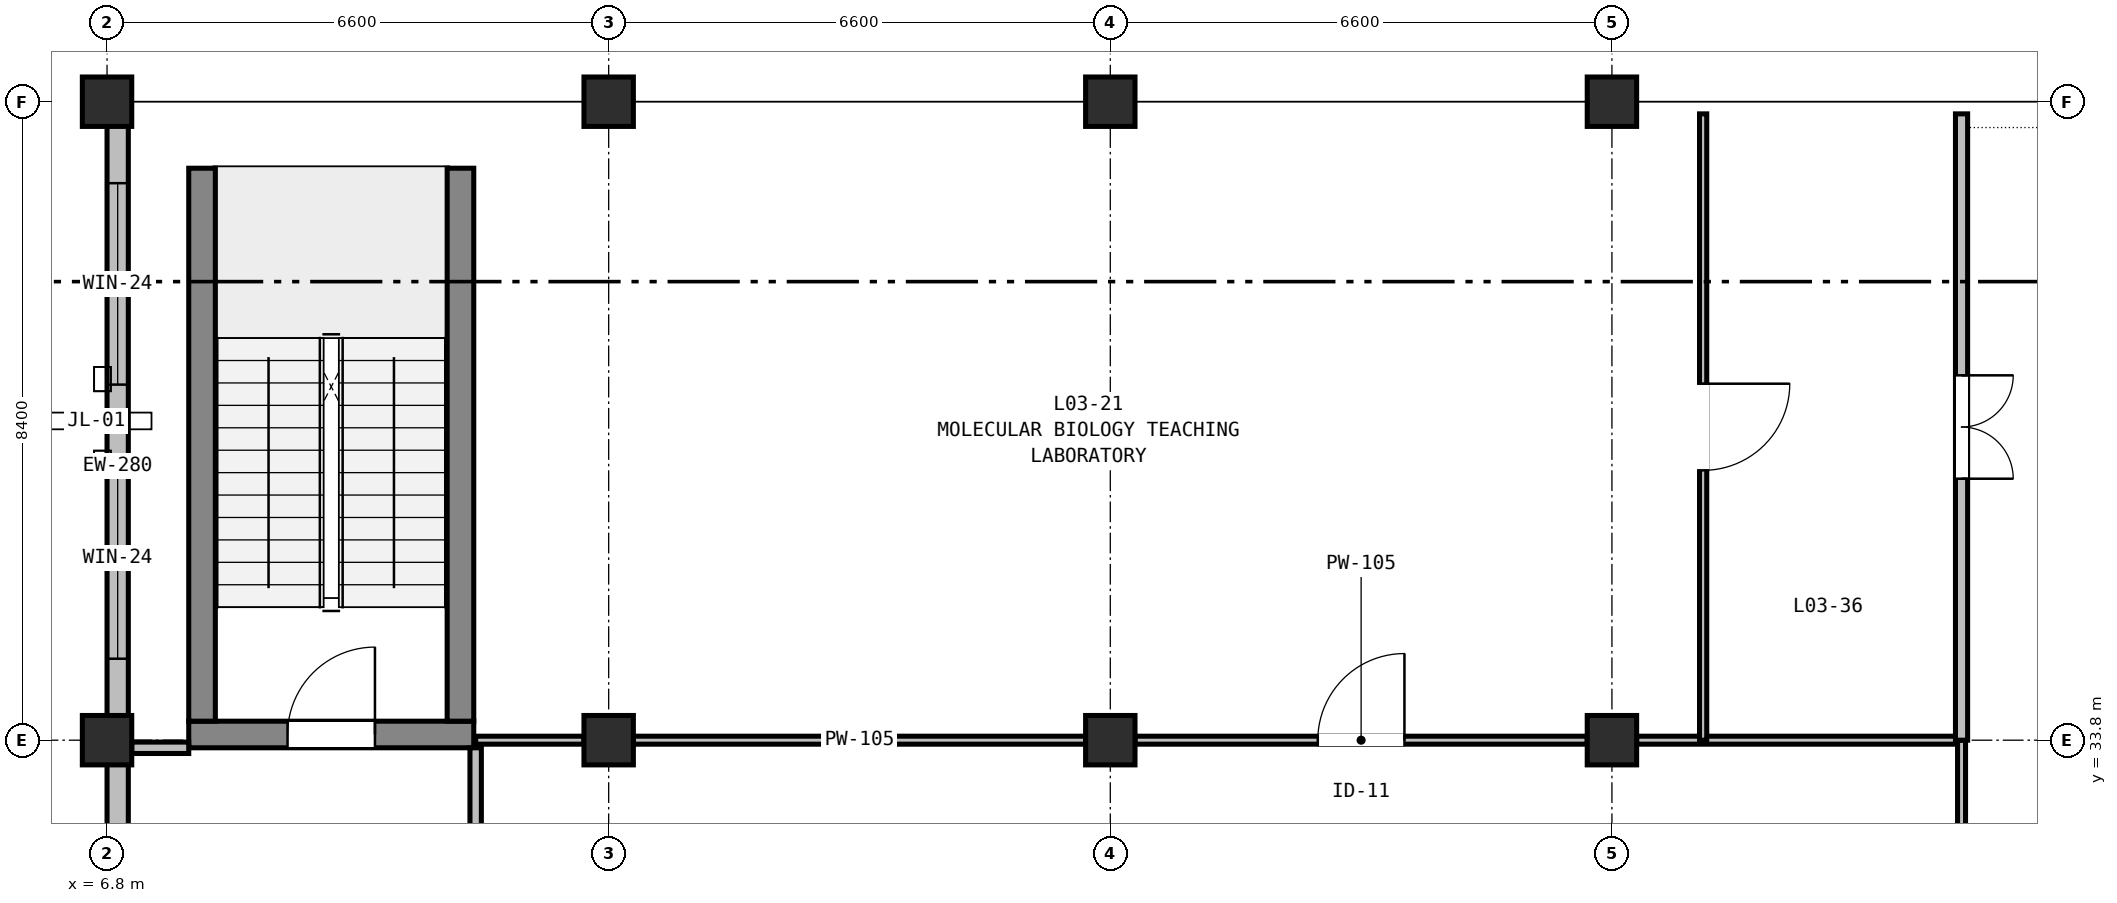
"""IFC4 building model, lengths in metres.
Left out: names, types, materials, properties, quantities, classifications, styles, units other than length and angle.
Written with IfcOpenShell. Run it as: python <this file> out.ifc"""

import sys

from ifc_helpers import new_model, si_unit, direction, frame, frame_2d, origin, origin_2d, place, context, subcontext, project, spatial, rectangle, extrude, element, fill, save


model = new_model("IFC4")
c1 = context("Model", 3, precision=1e-05, world=origin(), true_north=direction((0.0, 1.0)))
c2 = subcontext(c1, "Body", "Model", "MODEL_VIEW")
j1 = project(units=[si_unit("LENGTHUNIT", "METRE"), si_unit("PLANEANGLEUNIT", "RADIAN")], contexts=[c1])
p1 = place(None, origin())
s1 = spatial("IfcSite", under=j1, at=p1, CompositionType="ELEMENT")
p2 = place(p1, origin())
s2 = spatial("IfcBuilding", under=s1, at=p2, CompositionType="ELEMENT")
p3 = place(p2, frame((0.0, 0.0, 15.0)))
s3 = spatial("IfcBuildingStorey", under=s2, at=p3, CompositionType="ELEMENT", Elevation=15.0)
for number, where, z_axis, x_axis in (
    (1, (6.8, 33.8, 0.0), (0.0, 0.0, 1.0), (1.0, 0.0, 0.0)),
    (2, (6.8, 42.2, 0.0), (0.0, 0.0, 1.0), (1.0, 0.0, 0.0)),
    (3, (13.4, 33.8, 0.0), (0.0, 0.0, 1.0), (1.0, 0.0, 0.0)),
    (4, (13.4, 42.2, 0.0), (0.0, 0.0, 1.0), (1.0, 0.0, 0.0)),
    (5, (20.0, 33.8, 0.0), (0.0, 0.0, 1.0), (1.0, 0.0, 0.0)),
    (6, (20.0, 42.2, 0.0), (0.0, 0.0, 1.0), (1.0, 0.0, 0.0)),
    (7, (26.6, 33.8, 0.0), (0.0, 0.0, 1.0), (1.0, 0.0, 0.0)),
    (8, (26.6, 42.2, 0.0), (0.0, 0.0, 1.0), (1.0, 0.0, 0.0)),
):
    element("IfcColumn", number, at=place(p3, frame(where, z_axis=z_axis, x_axis=x_axis)), inside=s3, PredefinedType="COLUMN", context=c2, shape_type="SweptSolid", body=[
        extrude(rectangle(XDim=0.65, YDim=0.65, at=origin_2d()), origin(), (0.0, 0.0, 1.0), 4.5),
    ])
p4 = place(p3, frame((7.875, 33.875, 0.0), z_axis=(0.0, 0.0, 1.0), x_axis=(1.0, 0.0, 0.0)))
e9 = element("IfcWall", 9, at=p4, inside=s3, PredefinedType="SHEAR", context=c2, shape_type="SweptSolid", body=[
    extrude(rectangle(XDim=3.75, YDim=0.35, at=frame_2d((1.875, 0.0))), origin(), (0.0, 0.0, 1.0), 4.5),
])
p5 = place(p4, frame((1.3, 0.0, 0.0)))
e10 = element("IfcOpeningElement", 10, at=p5, cuts=e9, PredefinedType="OPENING", context=c2, shape_type="SweptSolid", body=[
    extrude(rectangle(XDim=1.15, YDim=2.15, at=frame_2d((0.575, 1.075))), frame((0.0, 0.185, 0.0), z_axis=(0.0, -1.0, 0.0), x_axis=(1.0, 0.0, 0.0)), (0.0, 0.0, 1.0), 0.37),
])
p6 = place(p3, frame((7.875, 41.5, 0.0), z_axis=(0.0, 0.0, 1.0), x_axis=(1.0, 0.0, 0.0)))
e11 = element("IfcWall", 11, at=p6, inside=s3, PredefinedType="SHEAR", context=c2, shape_type="SweptSolid", body=[
    extrude(rectangle(XDim=3.75, YDim=0.35, at=frame_2d((1.875, 0.0))), origin(), (0.0, 0.0, 1.0), 4.5),
])
for number, where, z_axis, x_axis in (
    (12, (8.05, 34.05, 0.0), (0.0, 0.0, 1.0), (0.0, 1.0, 0.0)),
    (13, (11.45, 34.05, 0.0), (0.0, 0.0, 1.0), (0.0, 1.0, 0.0)),
):
    element("IfcWall", number, at=place(p3, frame(where, z_axis=z_axis, x_axis=x_axis)), inside=s3, PredefinedType="SHEAR", context=c2, shape_type="SweptSolid", body=[
        extrude(rectangle(XDim=7.275, YDim=0.35, at=frame_2d((3.637, 0.0))), origin(), (0.0, 0.0, 1.0), 4.5),
    ])
p7 = place(p3, frame((6.94, 25.4, 0.0), z_axis=(0.0, 0.0, 1.0), x_axis=(0.0, 1.0, 0.0)))
e14 = element("IfcWall", 14, at=p7, inside=s3, PredefinedType="STANDARD", context=c2, shape_type="SweptSolid", body=[
    extrude(rectangle(XDim=8.12, YDim=0.28, at=frame_2d((4.06, 0.0))), origin(), (0.0, 0.0, 1.0), 3.785),
])
p8 = place(p7, frame((1.717, 0.0, 0.9)))
e15 = element("IfcOpeningElement", 15, at=p8, cuts=e14, PredefinedType="OPENING", context=c2, shape_type="SweptSolid", body=[
    extrude(rectangle(XDim=0.95, YDim=1.8, at=frame_2d((0.475, 0.9))), frame((0.0, 0.15, 0.0), z_axis=(0.0, -1.0, 0.0), x_axis=(1.0, 0.0, 0.0)), (0.0, 0.0, 1.0), 0.3),
])
p9 = place(p7, frame((5.453, 0.0, 0.9)))
e16 = element("IfcOpeningElement", 16, at=p9, cuts=e14, PredefinedType="OPENING", context=c2, shape_type="SweptSolid", body=[
    extrude(rectangle(XDim=0.95, YDim=1.8, at=frame_2d((0.475, 0.9))), frame((0.0, 0.15, 0.0), z_axis=(0.0, -1.0, 0.0), x_axis=(1.0, 0.0, 0.0)), (0.0, 0.0, 1.0), 0.3),
])
p10 = place(p3, frame((6.94, 34.08, 0.0), z_axis=(0.0, 0.0, 1.0), x_axis=(0.0, 1.0, 0.0)))
e17 = element("IfcWall", 17, at=p10, inside=s3, PredefinedType="STANDARD", context=c2, shape_type="SweptSolid", body=[
    extrude(rectangle(XDim=7.84, YDim=0.28, at=frame_2d((3.92, 0.0))), origin(), (0.0, 0.0, 1.0), 3.785),
])
p11 = place(p10, frame((0.792, 0.0, 0.9)))
e18 = element("IfcOpeningElement", 18, at=p11, cuts=e17, PredefinedType="OPENING", context=c2, shape_type="SweptSolid", body=[
    extrude(rectangle(XDim=2.65, YDim=1.85, at=frame_2d((1.325, 0.925))), frame((0.0, 0.15, 0.0), z_axis=(0.0, -1.0, 0.0), x_axis=(1.0, 0.0, 0.0)), (0.0, 0.0, 1.0), 0.3),
])
p12 = place(p10, frame((4.398, 0.0, 0.9)))
e19 = element("IfcOpeningElement", 19, at=p12, cuts=e17, PredefinedType="OPENING", context=c2, shape_type="SweptSolid", body=[
    extrude(rectangle(XDim=2.65, YDim=1.85, at=frame_2d((1.325, 0.925))), frame((0.0, 0.15, 0.0), z_axis=(0.0, -1.0, 0.0), x_axis=(1.0, 0.0, 0.0)), (0.0, 0.0, 1.0), 0.3),
])
for number, where, z_axis, x_axis in (
    (20, (6.8, 42.06, 0.0), (0.0, 0.0, 1.0), (1.0, 0.0, 0.0)),
    (21, (12.88, 42.06, 0.0), (0.0, 0.0, 1.0), (1.0, 0.0, 0.0)),
    (22, (13.4, 42.06, 0.0), (0.0, 0.0, 1.0), (1.0, 0.0, 0.0)),
    (23, (19.48, 42.06, 0.0), (0.0, 0.0, 1.0), (1.0, 0.0, 0.0)),
    (24, (20.0, 42.06, 0.0), (0.0, 0.0, 1.0), (1.0, 0.0, 0.0)),
    (25, (26.08, 42.06, 0.0), (0.0, 0.0, 1.0), (1.0, 0.0, 0.0)),
    (26, (26.6, 42.06, 0.0), (0.0, 0.0, 1.0), (1.0, 0.0, 0.0)),
):
    element("IfcWall", number, at=place(p3, frame(where, z_axis=z_axis, x_axis=x_axis)), inside=s3, PredefinedType="STANDARD", context=c2, shape_type="SweptSolid", body=[
        extrude(rectangle(XDim=0.52, YDim=0.28, at=frame_2d((0.26, 0.0))), origin(), (0.0, 0.0, 1.0), 3.735),
    ])
p13 = place(p3, frame((7.125, 33.7, 0.0), z_axis=(0.0, 0.0, 1.0), x_axis=(1.0, 0.0, 0.0)))
e27 = element("IfcWall", 27, at=p13, inside=s3, PredefinedType="PARTITIONING", context=c2, shape_type="SweptSolid", body=[
    extrude(rectangle(XDim=0.75, YDim=0.15, at=frame_2d((0.375, 0.0))), origin(), (0.0, 0.0, 1.0), 3.835),
])
p14 = place(p3, frame((11.65, 33.7, 0.0), z_axis=(0.0, 0.0, 1.0), x_axis=(0.0, -1.0, 0.0)))
e28 = element("IfcWall", 28, at=p14, inside=s3, PredefinedType="PARTITIONING", context=c2, shape_type="SweptSolid", body=[
    extrude(rectangle(XDim=3.6, YDim=0.15, at=frame_2d((1.8, 0.0))), origin(), (0.0, 0.0, 1.0), 3.835),
])
p15 = place(p3, frame((11.65, 33.8, 0.0), z_axis=(0.0, 0.0, 1.0), x_axis=(1.0, 0.0, 0.0)))
e29 = element("IfcWall", 29, at=p15, inside=s3, PredefinedType="PARTITIONING", context=c2, shape_type="SweptSolid", body=[
    extrude(rectangle(XDim=1.425, YDim=0.105, at=frame_2d((0.712, 0.0))), origin(), (0.0, 0.0, 1.0), 3.835),
])
p16 = place(p3, frame((13.725, 33.8, 0.0), z_axis=(0.0, 0.0, 1.0), x_axis=(1.0, 0.0, 0.0)))
e30 = element("IfcWall", 30, at=p16, inside=s3, PredefinedType="PARTITIONING", context=c2, shape_type="SweptSolid", body=[
    extrude(rectangle(XDim=5.95, YDim=0.105, at=frame_2d((2.975, 0.0))), origin(), (0.0, 0.0, 1.0), 3.835),
])
p17 = place(p3, frame((20.325, 33.8, 0.0), z_axis=(0.0, 0.0, 1.0), x_axis=(1.0, 0.0, 0.0)))
e31 = element("IfcWall", 31, at=p17, inside=s3, PredefinedType="PARTITIONING", context=c2, shape_type="SweptSolid", body=[
    extrude(rectangle(XDim=5.95, YDim=0.105, at=frame_2d((2.975, 0.0))), origin(), (0.0, 0.0, 1.0), 3.835),
])
p18 = place(p17, frame((2.405, 0.0, 0.0)))
e32 = element("IfcOpeningElement", 32, at=p18, cuts=e31, PredefinedType="OPENING", context=c2, shape_type="SweptSolid", body=[
    extrude(rectangle(XDim=1.14, YDim=2.06, at=frame_2d((0.57, 1.03))), frame((0.0, 0.062, 0.0), z_axis=(0.0, -1.0, 0.0), x_axis=(1.0, 0.0, 0.0)), (0.0, 0.0, 1.0), 0.125),
])
p19 = place(p3, frame((26.925, 33.8, 0.0), z_axis=(0.0, 0.0, 1.0), x_axis=(1.0, 0.0, 0.0)))
e33 = element("IfcWall", 33, at=p19, inside=s3, PredefinedType="PARTITIONING", context=c2, shape_type="SweptSolid", body=[
    extrude(rectangle(XDim=4.275, YDim=0.105, at=frame_2d((2.137, 0.0))), origin(), (0.0, 0.0, 1.0), 3.835),
])
p20 = place(p3, frame((31.2, 33.8, 0.0), z_axis=(0.0, 0.0, 1.0), x_axis=(0.0, -1.0, 0.0)))
e34 = element("IfcWall", 34, at=p20, inside=s3, PredefinedType="PARTITIONING", context=c2, shape_type="SweptSolid", body=[
    extrude(rectangle(XDim=8.4, YDim=0.105, at=frame_2d((4.2, 0.0))), origin(), (0.0, 0.0, 1.0), 3.835),
])
p21 = place(p20, frame((3.65, 0.0, 0.0)))
e35 = element("IfcOpeningElement", 35, at=p21, cuts=e34, PredefinedType="OPENING", context=c2, shape_type="SweptSolid", body=[
    extrude(rectangle(XDim=1.1, YDim=2.06, at=frame_2d((0.55, 1.03))), frame((0.0, 0.062, 0.0), z_axis=(0.0, -1.0, 0.0), x_axis=(1.0, 0.0, 0.0)), (0.0, 0.0, 1.0), 0.125),
])
p22 = place(p3, frame((27.8, 42.04, 0.0), z_axis=(0.0, 0.0, 1.0), x_axis=(0.0, -1.0, 0.0)))
e36 = element("IfcWall", 36, at=p22, inside=s3, PredefinedType="PARTITIONING", context=c2, shape_type="SweptSolid", body=[
    extrude(rectangle(XDim=8.24, YDim=0.095, at=frame_2d((4.12, 0.0))), origin(), (0.0, 0.0, 1.0), 3.785),
])
p23 = place(p22, frame((3.55, 0.0, 0.0)))
e37 = element("IfcOpeningElement", 37, at=p23, cuts=e36, PredefinedType="OPENING", context=c2, shape_type="SweptSolid", body=[
    extrude(rectangle(XDim=1.14, YDim=2.06, at=frame_2d((0.57, 1.03))), frame((0.0, 0.057, 0.0), z_axis=(0.0, -1.0, 0.0), x_axis=(1.0, 0.0, 0.0)), (0.0, 0.0, 1.0), 0.115),
])
p24 = place(p3, frame((31.2, 42.04, 0.0), z_axis=(0.0, 0.0, 1.0), x_axis=(0.0, -1.0, 0.0)))
e38 = element("IfcWall", 38, at=p24, inside=s3, PredefinedType="PARTITIONING", context=c2, shape_type="SweptSolid", body=[
    extrude(rectangle(XDim=8.24, YDim=0.16, at=frame_2d((4.12, 0.0))), origin(), (0.0, 0.0, 1.0), 3.785),
])
p25 = place(p24, frame((3.44, 0.0, 0.0)))
e39 = element("IfcOpeningElement", 39, at=p25, cuts=e38, PredefinedType="OPENING", context=c2, shape_type="SweptSolid", body=[
    extrude(rectangle(XDim=1.36, YDim=2.14, at=frame_2d((0.68, 1.07))), frame((0.0, 0.09, 0.0), z_axis=(0.0, -1.0, 0.0), x_axis=(1.0, 0.0, 0.0)), (0.0, 0.0, 1.0), 0.18),
])
p26 = place(p11, origin())
e40 = element("IfcWindow", 40, at=p26, inside=s3, PartitioningType="SINGLE_PANEL", PredefinedType="WINDOW", context=c2, shape_type="SweptSolid", body=[
    extrude(rectangle(XDim=2.65, YDim=1.85, at=frame_2d((1.325, 0.925))), frame((0.0, 0.03, 0.0), z_axis=(0.0, -1.0, 0.0), x_axis=(1.0, 0.0, 0.0)), (0.0, 0.0, 1.0), 0.06),
])
fill(e18, e40)
p27 = place(p12, origin())
e41 = element("IfcWindow", 41, at=p27, inside=s3, PartitioningType="SINGLE_PANEL", PredefinedType="WINDOW", context=c2, shape_type="SweptSolid", body=[
    extrude(rectangle(XDim=2.65, YDim=1.85, at=frame_2d((1.325, 0.925))), frame((0.0, 0.03, 0.0), z_axis=(0.0, -1.0, 0.0), x_axis=(1.0, 0.0, 0.0)), (0.0, 0.0, 1.0), 0.06),
])
fill(e19, e41)
p28 = place(p5, origin())
e42 = element("IfcDoor", 42, at=p28, inside=s3, OperationType="SINGLE_SWING_RIGHT", PredefinedType="DOOR", context=c2, shape_type="SweptSolid", body=[
    extrude(rectangle(XDim=1.15, YDim=2.15, at=frame_2d((0.575, 1.075))), frame((0.0, 0.025, 0.0), z_axis=(0.0, -1.0, 0.0), x_axis=(1.0, 0.0, 0.0)), (0.0, 0.0, 1.0), 0.05),
])
fill(e10, e42)
p29 = place(p23, origin())
e43 = element("IfcDoor", 43, at=p29, inside=s3, OperationType="SINGLE_SWING_LEFT", PredefinedType="DOOR", context=c2, shape_type="SweptSolid", body=[
    extrude(rectangle(XDim=1.14, YDim=2.06, at=frame_2d((0.57, 1.03))), frame((0.0, 0.025, 0.0), z_axis=(0.0, -1.0, 0.0), x_axis=(1.0, 0.0, 0.0)), (0.0, 0.0, 1.0), 0.05),
])
fill(e37, e43)
p30 = place(p18, origin())
e44 = element("IfcDoor", 44, at=p30, inside=s3, OperationType="SINGLE_SWING_RIGHT", PredefinedType="DOOR", context=c2, shape_type="SweptSolid", body=[
    extrude(rectangle(XDim=1.14, YDim=2.06, at=frame_2d((0.57, 1.03))), frame((0.0, 0.025, 0.0), z_axis=(0.0, -1.0, 0.0), x_axis=(1.0, 0.0, 0.0)), (0.0, 0.0, 1.0), 0.05),
])
fill(e32, e44)
p31 = place(p25, origin())
e45 = element("IfcDoor", 45, at=p31, inside=s3, OperationType="DOUBLE_DOOR_SINGLE_SWING", PredefinedType="DOOR", context=c2, shape_type="SweptSolid", body=[
    extrude(rectangle(XDim=1.36, YDim=2.14, at=frame_2d((0.68, 1.07))), frame((0.0, 0.025, 0.0), z_axis=(0.0, -1.0, 0.0), x_axis=(1.0, 0.0, 0.0)), (0.0, 0.0, 1.0), 0.05),
])
fill(e39, e45)
save(model, sys.argv[1])
